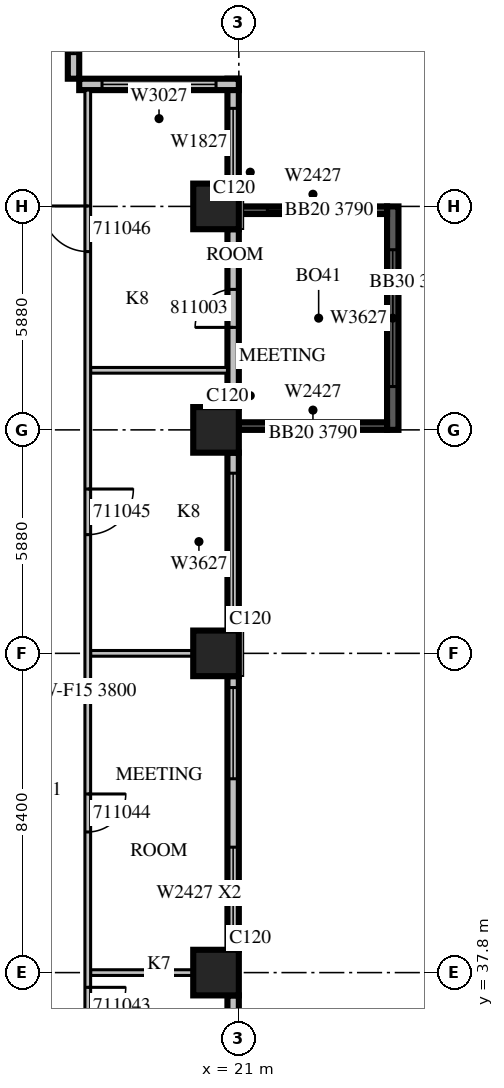
"""IFC4 building model, lengths in metres.
Left out: names, types, materials, properties, quantities, classifications, styles, units other than length and angle.
Written with IfcOpenShell. Run it as: python <this file> out.ifc"""

import sys

from ifc_helpers import new_model, si_unit, direction, frame, frame_2d, origin, origin_2d, place, context, subcontext, project, spatial, rectangle, extrude, source, transform, mapped, element, fill, save


model = new_model("IFC4")
c1 = context("Model", 3, precision=1e-05, world=origin(), true_north=direction((0.0, 1.0)))
c2 = subcontext(c1, "Body", "Model", "MODEL_VIEW")
j1 = project(units=[si_unit("LENGTHUNIT", "METRE"), si_unit("PLANEANGLEUNIT", "RADIAN")], contexts=[c1])
p1 = place(None, origin())
s1 = spatial("IfcSite", under=j1, at=p1, CompositionType="ELEMENT")
p2 = place(p1, origin())
s2 = spatial("IfcBuilding", under=s1, at=p2, CompositionType="ELEMENT")
p3 = place(p2, frame((0.0, 0.0, 57.3)))
s3 = spatial("IfcBuildingStorey", under=s2, at=p3, CompositionType="ELEMENT", Elevation=57.3)
m1 = source(origin(), c2, "Body", "SweptSolid", [
    extrude(rectangle(XDim=1.2, YDim=1.2, at=origin_2d()), origin(), (0.0, 0.0, 1.0), 4.2),
])
for number, where, z_axis, x_axis in (
    (1, (20.4, 37.8, 0.0), (0.0, 0.0, 1.0), (1.0, 0.0, 0.0)),
    (2, (20.4, 46.2, 0.0), (0.0, 0.0, 1.0), (1.0, 0.0, 0.0)),
    (3, (20.4, 52.08, 0.0), (0.0, 0.0, 1.0), (1.0, 0.0, 0.0)),
    (4, (20.4, 57.96, 0.0), (0.0, 0.0, 1.0), (1.0, 0.0, 0.0)),
):
    element("IfcColumn", number, at=place(p3, frame(where, z_axis=z_axis, x_axis=x_axis)), inside=s3, PredefinedType="COLUMN", context=c2, shape_type="MappedRepresentation", body=[
        mapped(m1, transform((0.0, 0.0, 0.0), scale=1.0)),
    ])
m2 = source(origin(), c2, "Body", "SweptSolid", [
    extrude(rectangle(XDim=7.2, YDim=0.3, at=frame_2d((3.6, 0.0))), origin(), (0.0, 0.0, 1.0), 3.8),
])
p4 = place(p3, frame((20.85, 30.0, 0.0), z_axis=(0.0, 0.0, 1.0), x_axis=(0.0, 1.0, 0.0)))
e5 = element("IfcWall", 5, at=p4, inside=s3, PredefinedType="STANDARD", context=c2, shape_type="MappedRepresentation", body=[
    mapped(m2, transform((0.0, 0.0, 0.0), scale=1.0)),
])
m3 = source(origin(), c2, "Body", "SweptSolid", [
    extrude(rectangle(XDim=2.4, YDim=2.7, at=frame_2d((1.2, 1.35))), frame((0.0, 0.16, 0.0), z_axis=(0.0, -1.0, 0.0), x_axis=(1.0, 0.0, 0.0)), (0.0, 0.0, 1.0), 0.32),
])
p5 = place(p4, frame((0.3, 0.0, 0.6)))
e6 = element("IfcOpeningElement", 6, at=p5, cuts=e5, PredefinedType="OPENING", context=c2, shape_type="MappedRepresentation", body=[
    mapped(m3, transform((0.0, 0.0, 0.0), scale=1.0)),
])
m4 = source(origin(), c2, "Body", "SweptSolid", [
    extrude(rectangle(XDim=1.2, YDim=2.7, at=frame_2d((0.6, 1.35))), frame((0.0, 0.16, 0.0), z_axis=(0.0, -1.0, 0.0), x_axis=(1.0, 0.0, 0.0)), (0.0, 0.0, 1.0), 0.32),
])
p6 = place(p4, frame((4.199, 0.0, 0.6)))
e7 = element("IfcOpeningElement", 7, at=p6, cuts=e5, PredefinedType="OPENING", context=c2, shape_type="MappedRepresentation", body=[
    mapped(m4, transform((0.0, 0.0, 0.0), scale=1.0)),
])
p7 = place(p3, frame((20.85, 38.4, 0.0), z_axis=(0.0, 0.0, 1.0), x_axis=(0.0, 1.0, 0.0)))
e8 = element("IfcWall", 8, at=p7, inside=s3, PredefinedType="STANDARD", context=c2, shape_type="MappedRepresentation", body=[
    mapped(m2, transform((0.0, 0.0, 0.0), scale=1.0)),
])
p8 = place(p7, frame((0.3, 0.0, 0.6)))
e9 = element("IfcOpeningElement", 9, at=p8, cuts=e8, PredefinedType="OPENING", context=c2, shape_type="MappedRepresentation", body=[
    mapped(m3, transform((0.0, 0.0, 0.0), scale=1.0)),
])
p9 = place(p7, frame((4.5, 0.0, 0.6)))
e10 = element("IfcOpeningElement", 10, at=p9, cuts=e8, PredefinedType="OPENING", context=c2, shape_type="MappedRepresentation", body=[
    mapped(m3, transform((0.0, 0.0, 0.0), scale=1.0)),
])
m5 = source(origin(), c2, "Body", "SweptSolid", [
    extrude(rectangle(XDim=4.68, YDim=0.3, at=frame_2d((2.34, 0.0))), origin(), (0.0, 0.0, 1.0), 3.8),
])
p10 = place(p3, frame((20.85, 46.8, 0.0), z_axis=(0.0, 0.0, 1.0), x_axis=(0.0, 1.0, 0.0)))
e11 = element("IfcWall", 11, at=p10, inside=s3, PredefinedType="STANDARD", context=c2, shape_type="MappedRepresentation", body=[
    mapped(m5, transform((0.0, 0.0, 0.0), scale=1.0)),
])
m6 = source(origin(), c2, "Body", "SweptSolid", [
    extrude(rectangle(XDim=3.6, YDim=2.7, at=frame_2d((1.8, 1.35))), frame((0.0, 0.16, 0.0), z_axis=(0.0, -1.0, 0.0), x_axis=(1.0, 0.0, 0.0)), (0.0, 0.0, 1.0), 0.32),
])
p11 = place(p10, frame((0.54, 0.0, 0.6)))
e12 = element("IfcOpeningElement", 12, at=p11, cuts=e11, PredefinedType="OPENING", context=c2, shape_type="MappedRepresentation", body=[
    mapped(m6, transform((0.0, 0.0, 0.0), scale=1.0)),
])
p12 = place(p3, frame((20.85, 52.68, 0.0), z_axis=(0.0, 0.0, 1.0), x_axis=(0.0, 1.0, 0.0)))
e13 = element("IfcWall", 13, at=p12, inside=s3, PredefinedType="STANDARD", context=c2, shape_type="MappedRepresentation", body=[
    mapped(m5, transform((0.0, 0.0, 0.0), scale=1.0)),
])
m7 = source(origin(), c2, "Body", "SweptSolid", [
    extrude(rectangle(XDim=1.0, YDim=2.1, at=frame_2d((0.5, 1.05))), frame((0.0, 0.16, 0.0), z_axis=(0.0, -1.0, 0.0), x_axis=(1.0, 0.0, 0.0)), (0.0, 0.0, 1.0), 0.32),
])
p13 = place(p12, frame((2.097, 0.0, 0.0)))
e14 = element("IfcOpeningElement", 14, at=p13, cuts=e13, PredefinedType="OPENING", context=c2, shape_type="MappedRepresentation", body=[
    mapped(m7, transform((0.0, 0.0, 0.0), scale=1.0)),
])
m8 = source(origin(), c2, "Body", "SweptSolid", [
    extrude(rectangle(XDim=2.76, YDim=0.3, at=frame_2d((1.38, 0.0))), origin(), (0.0, 0.0, 1.0), 3.8),
])
p14 = place(p3, frame((20.85, 58.56, 0.0), z_axis=(0.0, 0.0, 1.0), x_axis=(0.0, 1.0, 0.0)))
e15 = element("IfcWall", 15, at=p14, inside=s3, PredefinedType="STANDARD", context=c2, shape_type="MappedRepresentation", body=[
    mapped(m8, transform((0.0, 0.0, 0.0), scale=1.0)),
])
m9 = source(origin(), c2, "Body", "SweptSolid", [
    extrude(rectangle(XDim=1.8, YDim=2.7, at=frame_2d((0.9, 1.35))), frame((0.0, 0.16, 0.0), z_axis=(0.0, -1.0, 0.0), x_axis=(1.0, 0.0, 0.0)), (0.0, 0.0, 1.0), 0.32),
])
p15 = place(p14, frame((0.18, 0.0, 0.6)))
e16 = element("IfcOpeningElement", 16, at=p15, cuts=e15, PredefinedType="OPENING", context=c2, shape_type="MappedRepresentation", body=[
    mapped(m9, transform((0.0, 0.0, 0.0), scale=1.0)),
])
m10 = source(origin(), c2, "Body", "SweptSolid", [
    extrude(rectangle(XDim=4.2, YDim=0.3, at=frame_2d((2.1, 0.0))), origin(), (0.0, 0.0, 1.0), 3.8),
])
p16 = place(p3, frame((21.0, 61.17, 0.0), z_axis=(0.0, 0.0, 1.0), x_axis=(-1.0, 0.0, 0.0)))
e17 = element("IfcWall", 17, at=p16, inside=s3, PredefinedType="STANDARD", context=c2, shape_type="MappedRepresentation", body=[
    mapped(m10, transform((0.0, 0.0, 0.0), scale=1.0)),
])
m11 = source(origin(), c2, "Body", "SweptSolid", [
    extrude(rectangle(XDim=3.0, YDim=2.7, at=frame_2d((1.5, 1.35))), frame((0.0, 0.16, 0.0), z_axis=(0.0, -1.0, 0.0), x_axis=(1.0, 0.0, 0.0)), (0.0, 0.0, 1.0), 0.32),
])
p17 = place(p16, frame((0.6, 0.0, 0.6)))
e18 = element("IfcOpeningElement", 18, at=p17, cuts=e17, PredefinedType="OPENING", context=c2, shape_type="MappedRepresentation", body=[
    mapped(m11, transform((0.0, 0.0, 0.0), scale=1.0)),
])
m12 = source(origin(), c2, "Body", "SweptSolid", [
    extrude(rectangle(XDim=2.52, YDim=0.3, at=frame_2d((1.26, 0.0))), origin(), (0.0, 0.0, 1.0), 3.8),
])
p18 = place(p3, frame((16.65, 61.32, 0.0), z_axis=(0.0, 0.0, 1.0), x_axis=(0.0, 1.0, 0.0)))
e19 = element("IfcWall", 19, at=p18, inside=s3, PredefinedType="STANDARD", context=c2, shape_type="MappedRepresentation", body=[
    mapped(m12, transform((0.0, 0.0, 0.0), scale=1.0)),
])
p19 = place(p18, frame((0.66, 0.0, 0.6)))
e20 = element("IfcOpeningElement", 20, at=p19, cuts=e19, PredefinedType="OPENING", context=c2, shape_type="MappedRepresentation", body=[
    mapped(m4, transform((0.0, 0.0, 0.0), scale=1.0)),
])
m13 = source(origin(), c2, "Body", "SweptSolid", [
    extrude(rectangle(XDim=5.88, YDim=0.3, at=frame_2d((2.94, 0.0))), origin(), (0.0, 0.0, 1.0), 3.79),
])
p20 = place(p3, frame((25.05, 52.08, 0.0), z_axis=(0.0, 0.0, 1.0), x_axis=(0.0, 1.0, 0.0)))
e21 = element("IfcWall", 21, at=p20, inside=s3, PredefinedType="SOLIDWALL", context=c2, shape_type="MappedRepresentation", body=[
    mapped(m13, transform((0.0, 0.0, 0.0), scale=1.0)),
])
p21 = place(p20, frame((1.14, 0.0, 0.6)))
e22 = element("IfcOpeningElement", 22, at=p21, cuts=e21, PredefinedType="OPENING", context=c2, shape_type="MappedRepresentation", body=[
    mapped(m6, transform((0.0, 0.0, 0.0), scale=1.0)),
])
m14 = source(origin(), c2, "Body", "SweptSolid", [
    extrude(rectangle(XDim=3.9, YDim=0.2, at=frame_2d((1.95, 0.0))), origin(), (0.0, 0.0, 1.0), 3.79),
])
p22 = place(p3, frame((21.0, 52.18, 0.0), z_axis=(0.0, 0.0, 1.0), x_axis=(1.0, 0.0, 0.0)))
e23 = element("IfcWall", 23, at=p22, inside=s3, PredefinedType="SOLIDWALL", context=c2, shape_type="MappedRepresentation", body=[
    mapped(m14, transform((0.0, 0.0, 0.0), scale=1.0)),
])
m15 = source(origin(), c2, "Body", "SweptSolid", [
    extrude(rectangle(XDim=2.4, YDim=2.7, at=frame_2d((1.2, 1.35))), frame((0.0, 0.11, 0.0), z_axis=(0.0, -1.0, 0.0), x_axis=(1.0, 0.0, 0.0)), (0.0, 0.0, 1.0), 0.22),
])
p23 = place(p22, frame((0.75, 0.0, 0.6)))
e24 = element("IfcOpeningElement", 24, at=p23, cuts=e23, PredefinedType="OPENING", context=c2, shape_type="MappedRepresentation", body=[
    mapped(m15, transform((0.0, 0.0, 0.0), scale=1.0)),
])
p24 = place(p3, frame((21.0, 57.86, 0.0), z_axis=(0.0, 0.0, 1.0), x_axis=(1.0, 0.0, 0.0)))
e25 = element("IfcWall", 25, at=p24, inside=s3, PredefinedType="SOLIDWALL", context=c2, shape_type="MappedRepresentation", body=[
    mapped(m14, transform((0.0, 0.0, 0.0), scale=1.0)),
])
p25 = place(p24, frame((0.75, 0.0, 0.6)))
e26 = element("IfcOpeningElement", 26, at=p25, cuts=e25, PredefinedType="OPENING", context=c2, shape_type="MappedRepresentation", body=[
    mapped(m15, transform((0.0, 0.0, 0.0), scale=1.0)),
])
m16 = source(origin(), c2, "Body", "SweptSolid", [
    extrude(rectangle(XDim=3.6, YDim=0.15, at=frame_2d((1.8, 0.0))), origin(), (0.0, 0.0, 1.0), 3.8),
])
p26 = place(p3, frame((17.1, 53.648, 0.0), z_axis=(0.0, 0.0, 1.0), x_axis=(1.0, 0.0, 0.0)))
e27 = element("IfcWall", 27, at=p26, inside=s3, PredefinedType="PARTITIONING", context=c2, shape_type="MappedRepresentation", body=[
    mapped(m16, transform((0.0, 0.0, 0.0), scale=1.0)),
])
m17 = source(origin(), c2, "Body", "SweptSolid", [
    extrude(rectangle(XDim=2.701, YDim=0.15, at=frame_2d((1.351, 0.0))), origin(), (0.0, 0.0, 1.0), 3.8),
])
for number, where, z_axis, x_axis in (
    (28, (19.801, 37.8, 0.0), (0.0, 0.0, 1.0), (-1.0, 0.0, 0.0)),
    (29, (19.801, 46.2, 0.0), (0.0, 0.0, 1.0), (-1.0, 0.0, 0.0)),
):
    element("IfcWall", number, at=place(p3, frame(where, z_axis=z_axis, x_axis=x_axis)), inside=s3, PredefinedType="PARTITIONING", context=c2, shape_type="MappedRepresentation", body=[
        mapped(m17, transform((0.0, 0.0, 0.0), scale=1.0)),
    ])
m18 = source(origin(), c2, "Body", "SweptSolid", [
    extrude(rectangle(XDim=31.62, YDim=0.15, at=frame_2d((15.81, 0.0))), origin(), (0.0, 0.0, 1.0), 3.8),
])
p27 = place(p3, frame((17.025, 61.02, 0.0), z_axis=(0.0, 0.0, 1.0), x_axis=(0.0, -1.0, 0.0)))
e30 = element("IfcWall", 30, at=p27, inside=s3, PredefinedType="PARTITIONING", context=c2, shape_type="MappedRepresentation", body=[
    mapped(m18, transform((0.0, 0.0, 0.0), scale=1.0)),
])
m19 = source(origin(), c2, "Body", "SweptSolid", [
    extrude(rectangle(XDim=1.0, YDim=2.1, at=frame_2d((0.5, 1.05))), frame((0.0, 0.085, 0.0), z_axis=(0.0, -1.0, 0.0), x_axis=(1.0, 0.0, 0.0)), (0.0, 0.0, 1.0), 0.17),
])
p28 = place(p27, frame((29.263, 0.0, 0.0)))
e31 = element("IfcOpeningElement", 31, at=p28, cuts=e30, PredefinedType="OPENING", context=c2, shape_type="MappedRepresentation", body=[
    mapped(m19, transform((0.0, 0.0, 0.0), scale=1.0)),
])
p29 = place(p27, frame((25.951, 0.0, 0.0)))
e32 = element("IfcOpeningElement", 32, at=p29, cuts=e30, PredefinedType="OPENING", context=c2, shape_type="MappedRepresentation", body=[
    mapped(m19, transform((0.0, 0.0, 0.0), scale=1.0)),
])
p30 = place(p27, frame((23.608, 0.0, 0.0)))
e33 = element("IfcOpeningElement", 33, at=p30, cuts=e30, PredefinedType="OPENING", context=c2, shape_type="MappedRepresentation", body=[
    mapped(m19, transform((0.0, 0.0, 0.0), scale=1.0)),
])
p31 = place(p27, frame((18.52, 0.0, 0.0)))
e34 = element("IfcOpeningElement", 34, at=p31, cuts=e30, PredefinedType="OPENING", context=c2, shape_type="MappedRepresentation", body=[
    mapped(m19, transform((0.0, 0.0, 0.0), scale=1.0)),
])
m20 = source(origin(), c2, "Body", "SweptSolid", [
    extrude(rectangle(XDim=1.2, YDim=2.1, at=frame_2d((0.6, 1.05))), frame((0.0, 0.085, 0.0), z_axis=(0.0, -1.0, 0.0), x_axis=(1.0, 0.0, 0.0)), (0.0, 0.0, 1.0), 0.17),
])
p32 = place(p27, frame((10.496, 0.0, 0.0)))
e35 = element("IfcOpeningElement", 35, at=p32, cuts=e30, PredefinedType="OPENING", context=c2, shape_type="MappedRepresentation", body=[
    mapped(m20, transform((0.0, 0.0, 0.0), scale=1.0)),
])
p33 = place(p27, frame((3.049, 0.0, 0.0)))
e36 = element("IfcOpeningElement", 36, at=p33, cuts=e30, PredefinedType="OPENING", context=c2, shape_type="MappedRepresentation", body=[
    mapped(m20, transform((0.0, 0.0, 0.0), scale=1.0)),
])
m21 = source(origin(), c2, "Body", "SweptSolid", [
    extrude(rectangle(XDim=2.4, YDim=2.7, at=frame_2d((1.2, 1.35))), frame((0.0, 0.03, 0.0), z_axis=(0.0, -1.0, 0.0), x_axis=(1.0, 0.0, 0.0)), (0.0, 0.0, 1.0), 0.06),
])
p34 = place(p8, origin())
e37 = element("IfcWindow", 37, at=p34, inside=s3, PartitioningType="SINGLE_PANEL", PredefinedType="WINDOW", context=c2, shape_type="MappedRepresentation", body=[
    mapped(m21, transform((0.0, 0.0, 0.0), scale=1.0)),
])
fill(e9, e37)
p35 = place(p9, origin())
e38 = element("IfcWindow", 38, at=p35, inside=s3, PartitioningType="SINGLE_PANEL", PredefinedType="WINDOW", context=c2, shape_type="MappedRepresentation", body=[
    mapped(m21, transform((0.0, 0.0, 0.0), scale=1.0)),
])
fill(e10, e38)
m22 = source(origin(), c2, "Body", "SweptSolid", [
    extrude(rectangle(XDim=3.6, YDim=2.7, at=frame_2d((1.8, 1.35))), frame((0.0, 0.03, 0.0), z_axis=(0.0, -1.0, 0.0), x_axis=(1.0, 0.0, 0.0)), (0.0, 0.0, 1.0), 0.06),
])
p36 = place(p11, origin())
e39 = element("IfcWindow", 39, at=p36, inside=s3, PartitioningType="SINGLE_PANEL", PredefinedType="WINDOW", context=c2, shape_type="MappedRepresentation", body=[
    mapped(m22, transform((0.0, 0.0, 0.0), scale=1.0)),
])
fill(e12, e39)
m23 = source(origin(), c2, "Body", "SweptSolid", [
    extrude(rectangle(XDim=1.8, YDim=2.7, at=frame_2d((0.9, 1.35))), frame((0.0, 0.03, 0.0), z_axis=(0.0, -1.0, 0.0), x_axis=(1.0, 0.0, 0.0)), (0.0, 0.0, 1.0), 0.06),
])
p37 = place(p15, origin())
e40 = element("IfcWindow", 40, at=p37, inside=s3, PartitioningType="SINGLE_PANEL", PredefinedType="WINDOW", context=c2, shape_type="MappedRepresentation", body=[
    mapped(m23, transform((0.0, 0.0, 0.0), scale=1.0)),
])
fill(e16, e40)
m24 = source(origin(), c2, "Body", "SweptSolid", [
    extrude(rectangle(XDim=3.0, YDim=2.7, at=frame_2d((1.5, 1.35))), frame((0.0, 0.03, 0.0), z_axis=(0.0, -1.0, 0.0), x_axis=(1.0, 0.0, 0.0)), (0.0, 0.0, 1.0), 0.06),
])
p38 = place(p17, origin())
e41 = element("IfcWindow", 41, at=p38, inside=s3, PartitioningType="SINGLE_PANEL", PredefinedType="WINDOW", context=c2, shape_type="MappedRepresentation", body=[
    mapped(m24, transform((0.0, 0.0, 0.0), scale=1.0)),
])
fill(e18, e41)
m25 = source(origin(), c2, "Body", "SweptSolid", [
    extrude(rectangle(XDim=1.2, YDim=2.7, at=frame_2d((0.6, 1.35))), frame((0.0, 0.03, 0.0), z_axis=(0.0, -1.0, 0.0), x_axis=(1.0, 0.0, 0.0)), (0.0, 0.0, 1.0), 0.06),
])
p39 = place(p19, origin())
e42 = element("IfcWindow", 42, at=p39, inside=s3, PartitioningType="SINGLE_PANEL", PredefinedType="WINDOW", context=c2, shape_type="MappedRepresentation", body=[
    mapped(m25, transform((0.0, 0.0, 0.0), scale=1.0)),
])
fill(e20, e42)
p40 = place(p21, origin())
e43 = element("IfcWindow", 43, at=p40, inside=s3, PartitioningType="SINGLE_PANEL", PredefinedType="WINDOW", context=c2, shape_type="MappedRepresentation", body=[
    mapped(m22, transform((0.0, 0.0, 0.0), scale=1.0)),
])
fill(e22, e43)
p41 = place(p23, origin())
e44 = element("IfcWindow", 44, at=p41, inside=s3, PartitioningType="SINGLE_PANEL", PredefinedType="WINDOW", context=c2, shape_type="MappedRepresentation", body=[
    mapped(m21, transform((0.0, 0.0, 0.0), scale=1.0)),
])
fill(e24, e44)
p42 = place(p25, origin())
e45 = element("IfcWindow", 45, at=p42, inside=s3, PartitioningType="SINGLE_PANEL", PredefinedType="WINDOW", context=c2, shape_type="MappedRepresentation", body=[
    mapped(m21, transform((0.0, 0.0, 0.0), scale=1.0)),
])
fill(e26, e45)
m26 = source(origin(), c2, "Body", "SweptSolid", [
    extrude(rectangle(XDim=1.0, YDim=2.1, at=frame_2d((0.5, 1.05))), frame((0.0, 0.025, 0.0), z_axis=(0.0, -1.0, 0.0), x_axis=(1.0, 0.0, 0.0)), (0.0, 0.0, 1.0), 0.05),
])
p43 = place(p30, origin())
e46 = element("IfcDoor", 46, at=p43, inside=s3, OperationType="SINGLE_SWING_LEFT", PredefinedType="DOOR", context=c2, shape_type="MappedRepresentation", body=[
    mapped(m26, transform((0.0, 0.0, 0.0), scale=1.0)),
])
fill(e33, e46)
p44 = place(p31, origin())
e47 = element("IfcDoor", 47, at=p44, inside=s3, OperationType="SINGLE_SWING_LEFT", PredefinedType="DOOR", context=c2, shape_type="MappedRepresentation", body=[
    mapped(m26, transform((0.0, 0.0, 0.0), scale=1.0)),
])
fill(e34, e47)
m27 = source(origin(), c2, "Body", "SweptSolid", [
    extrude(rectangle(XDim=1.2, YDim=2.1, at=frame_2d((0.6, 1.05))), frame((0.0, 0.025, 0.0), z_axis=(0.0, -1.0, 0.0), x_axis=(1.0, 0.0, 0.0)), (0.0, 0.0, 1.0), 0.05),
])
p45 = place(p32, origin())
e48 = element("IfcDoor", 48, at=p45, inside=s3, OperationType="SINGLE_SWING_LEFT", PredefinedType="DOOR", context=c2, shape_type="MappedRepresentation", body=[
    mapped(m27, transform((0.0, 0.0, 0.0), scale=1.0)),
])
fill(e35, e48)
p46 = place(p33, origin())
e49 = element("IfcDoor", 49, at=p46, inside=s3, OperationType="SINGLE_SWING_RIGHT", PredefinedType="DOOR", context=c2, shape_type="MappedRepresentation", body=[
    mapped(m27, transform((0.0, 0.0, 0.0), scale=1.0)),
])
fill(e36, e49)
p47 = place(p13, origin())
e50 = element("IfcDoor", 50, at=p47, inside=s3, OperationType="SINGLE_SWING_LEFT", PredefinedType="DOOR", context=c2, shape_type="MappedRepresentation", body=[
    mapped(m26, transform((0.0, 0.0, 0.0), scale=1.0)),
])
fill(e14, e50)
save(model, sys.argv[1])
